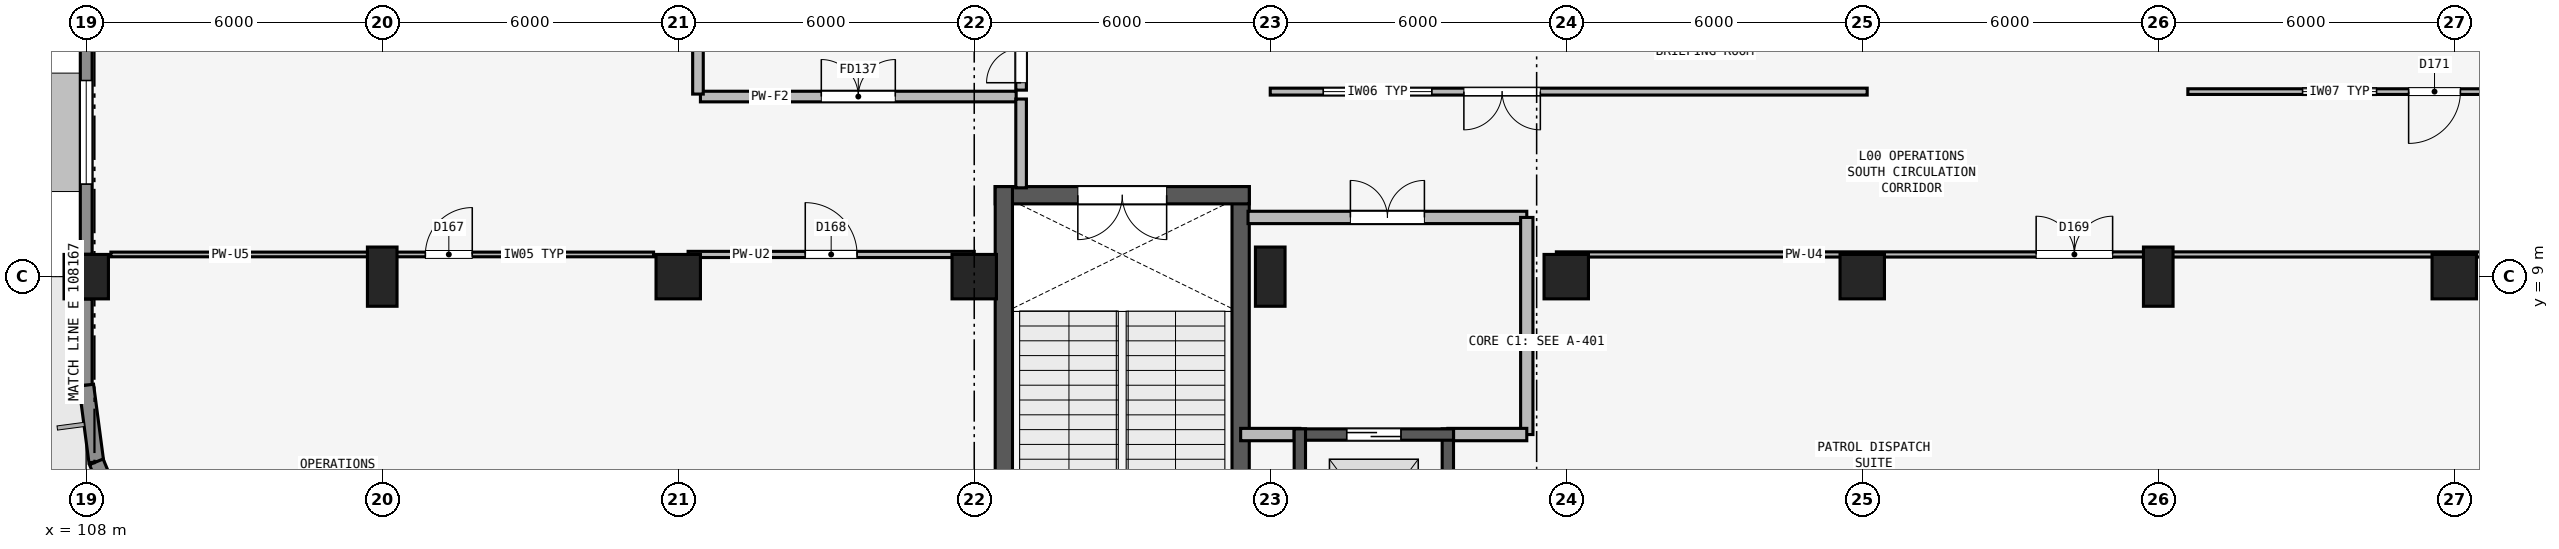
"""IFC4 building model, lengths in metres.
Left out: names, types, materials, properties, quantities, classifications, styles, units other than length and angle.
Written with IfcOpenShell. Run it as: python <this file> out.ifc"""

import sys

from ifc_helpers import new_model, si_unit, direction, frame, frame_2d, origin, origin_2d, place, context, subcontext, project, spatial, rectangle, extrude, element, fill, save


model = new_model("IFC4")
c1 = context("Model", 3, precision=1e-05, world=origin(), true_north=direction((0.0, 1.0)))
c2 = subcontext(c1, "Body", "Model", "MODEL_VIEW")
j1 = project(units=[si_unit("LENGTHUNIT", "METRE"), si_unit("PLANEANGLEUNIT", "RADIAN")], contexts=[c1])
p1 = place(None, origin())
s1 = spatial("IfcSite", under=j1, at=p1, CompositionType="ELEMENT")
p2 = place(p1, origin())
s2 = spatial("IfcBuilding", under=s1, at=p2, CompositionType="ELEMENT")
p3 = place(p2, origin())
s3 = spatial("IfcBuildingStorey", under=s2, at=p3, CompositionType="ELEMENT", Elevation=0.0)
p4 = place(p3, frame((108.0, 9.0, 0.0), z_axis=(0.0, 0.0, 1.0), x_axis=(1.0, 0.0, 0.0)))
e1 = element("IfcColumn", 1, at=p4, inside=s3, PredefinedType="COLUMN", context=c2, shape_type="SweptSolid", body=[
    extrude(rectangle(XDim=0.9, YDim=0.9, at=origin_2d()), origin(), (0.0, 0.0, 1.0), 4.8),
])
p5 = place(p3, frame((114.0, 9.0, 0.0), z_axis=(0.0, 0.0, 1.0), x_axis=(1.0, 0.0, 0.0)))
e2 = element("IfcColumn", 2, at=p5, inside=s3, PredefinedType="COLUMN", context=c2, shape_type="SweptSolid", body=[
    extrude(rectangle(XDim=0.6, YDim=1.2, at=origin_2d()), origin(), (0.0, 0.0, 1.0), 4.8),
])
for number, where, z_axis, x_axis in (
    (3, (120.0, 9.0, 0.0), (0.0, 0.0, 1.0), (1.0, 0.0, 0.0)),
    (4, (126.0, 9.0, 0.0), (0.0, 0.0, 1.0), (1.0, 0.0, 0.0)),
):
    element("IfcColumn", number, at=place(p3, frame(where, z_axis=z_axis, x_axis=x_axis)), inside=s3, PredefinedType="COLUMN", context=c2, shape_type="SweptSolid", body=[
        extrude(rectangle(XDim=0.9, YDim=0.9, at=origin_2d()), origin(), (0.0, 0.0, 1.0), 4.8),
    ])
p6 = place(p3, frame((132.0, 9.0, 0.0), z_axis=(0.0, 0.0, 1.0), x_axis=(1.0, 0.0, 0.0)))
e5 = element("IfcColumn", 5, at=p6, inside=s3, PredefinedType="COLUMN", context=c2, shape_type="SweptSolid", body=[
    extrude(rectangle(XDim=0.6, YDim=1.2, at=origin_2d()), origin(), (0.0, 0.0, 1.0), 4.8),
])
for number, where, z_axis, x_axis in (
    (6, (138.0, 9.0, 0.0), (0.0, 0.0, 1.0), (1.0, 0.0, 0.0)),
    (7, (144.0, 9.0, 0.0), (0.0, 0.0, 1.0), (1.0, 0.0, 0.0)),
):
    element("IfcColumn", number, at=place(p3, frame(where, z_axis=z_axis, x_axis=x_axis)), inside=s3, PredefinedType="COLUMN", context=c2, shape_type="SweptSolid", body=[
        extrude(rectangle(XDim=0.9, YDim=0.9, at=origin_2d()), origin(), (0.0, 0.0, 1.0), 4.8),
    ])
p7 = place(p3, frame((150.0, 9.0, 0.0), z_axis=(0.0, 0.0, 1.0), x_axis=(1.0, 0.0, 0.0)))
e8 = element("IfcColumn", 8, at=p7, inside=s3, PredefinedType="COLUMN", context=c2, shape_type="SweptSolid", body=[
    extrude(rectangle(XDim=0.6, YDim=1.2, at=origin_2d()), origin(), (0.0, 0.0, 1.0), 4.8),
])
p8 = place(p3, frame((156.0, 9.0, 0.0), z_axis=(0.0, 0.0, 1.0), x_axis=(1.0, 0.0, 0.0)))
e9 = element("IfcColumn", 9, at=p8, inside=s3, PredefinedType="COLUMN", context=c2, shape_type="SweptSolid", body=[
    extrude(rectangle(XDim=0.9, YDim=0.9, at=origin_2d()), origin(), (0.0, 0.0, 1.0), 4.8),
])
p9 = place(p3, frame((108.0, 6.8, 0.0), z_axis=(0.0, 0.0, 1.0), x_axis=(0.0, 1.0, 0.0)))
e10 = element("IfcWall", 10, at=p9, inside=s3, PredefinedType="SOLIDWALL", context=c2, shape_type="SweptSolid", body=[
    extrude(rectangle(XDim=1.746, YDim=0.24, at=frame_2d((0.873, 0.0))), origin(), (0.0, 0.0, 1.0), 4.495),
])
p10 = place(p3, frame((108.0, 9.454, 0.0), z_axis=(0.0, 0.0, 1.0), x_axis=(0.0, 1.0, 0.0)))
e11 = element("IfcWall", 11, at=p10, inside=s3, PredefinedType="SOLIDWALL", context=c2, shape_type="SweptSolid", body=[
    extrude(rectangle(XDim=4.942, YDim=0.24, at=frame_2d((2.471, 0.0))), origin(), (0.0, 0.0, 1.0), 4.09),
])
p11 = place(p10, frame((1.421, 0.0, 0.9)))
e12 = element("IfcOpeningElement", 12, at=p11, cuts=e11, PredefinedType="OPENING", context=c2, shape_type="SweptSolid", body=[
    extrude(rectangle(XDim=2.1, YDim=1.5, at=frame_2d((1.05, 0.75))), frame((0.0, 0.13, 0.0), z_axis=(0.0, -1.0, 0.0), x_axis=(1.0, 0.0, 0.0)), (0.0, 0.0, 1.0), 0.26),
])
p12 = place(p3, frame((108.0, 6.8, 0.0), z_axis=(0.0, 0.0, 1.0), x_axis=(0.130458544462, -0.991453765022, 0.0)))
e13 = element("IfcWall", 13, at=p12, inside=s3, PredefinedType="SOLIDWALL", context=c2, shape_type="SweptSolid", body=[
    extrude(rectangle(XDim=1.566, YDim=0.3, at=frame_2d((0.783, 0.0))), origin(), (0.0, 0.0, 1.0), 4.495),
])
p13 = place(p3, frame((108.204, 5.247, 0.0), z_axis=(0.0, 0.0, 1.0), x_axis=(0.382677606907, -0.923881945474, 0.0)))
e14 = element("IfcWall", 14, at=p13, inside=s3, PredefinedType="SOLIDWALL", context=c2, shape_type="SweptSolid", body=[
    extrude(rectangle(XDim=1.566, YDim=0.3, at=frame_2d((0.783, 0.0))), origin(), (0.0, 0.0, 1.0), 4.495),
])
p14 = place(p3, frame((131.4, 1.075, 0.0), z_axis=(0.0, 0.0, 1.0), x_axis=(0.0, 1.0, 0.0)))
e15 = element("IfcWall", 15, at=p14, inside=s3, PredefinedType="SHEAR", context=c2, shape_type="SweptSolid", body=[
    extrude(rectangle(XDim=9.75, YDim=0.35, at=frame_2d((4.875, 0.0))), origin(), (0.0, 0.0, 1.0), 4.66),
])
p15 = place(p3, frame((131.575, 10.65, 0.0), z_axis=(0.0, 0.0, 1.0), x_axis=(-1.0, 0.0, 0.0)))
e16 = element("IfcWall", 16, at=p15, inside=s3, PredefinedType="SHEAR", context=c2, shape_type="SweptSolid", body=[
    extrude(rectangle(XDim=5.15, YDim=0.35, at=frame_2d((2.575, 0.0))), origin(), (0.0, 0.0, 1.0), 4.66),
])
p16 = place(p15, frame((1.675, 0.0, 0.0)))
e17 = element("IfcOpeningElement", 17, at=p16, cuts=e16, PredefinedType="OPENING", context=c2, shape_type="SweptSolid", body=[
    extrude(rectangle(XDim=1.8, YDim=2.2, at=frame_2d((0.9, 1.1))), frame((0.0, 0.185, 0.0), z_axis=(0.0, -1.0, 0.0), x_axis=(1.0, 0.0, 0.0)), (0.0, 0.0, 1.0), 0.37),
])
p17 = place(p3, frame((126.6, 10.825, 0.0), z_axis=(0.0, 0.0, 1.0), x_axis=(0.0, -1.0, 0.0)))
e18 = element("IfcWall", 18, at=p17, inside=s3, PredefinedType="SHEAR", context=c2, shape_type="SweptSolid", body=[
    extrude(rectangle(XDim=9.75, YDim=0.35, at=frame_2d((4.875, 0.0))), origin(), (0.0, 0.0, 1.0), 4.66),
])
p18 = place(p3, frame((126.95, 12.78, 0.0), z_axis=(0.0, 0.0, 1.0), x_axis=(0.0, 1.0, 0.0)))
e19 = element("IfcWall", 19, at=p18, inside=s3, PredefinedType="PARTITIONING", context=c2, shape_type="SweptSolid", body=[
    extrude(rectangle(XDim=1.7, YDim=0.215, at=frame_2d((0.85, 0.0))), origin(), (0.0, 0.0, 1.0), 4.49),
])
p19 = place(p18, frame((0.15, 0.0, 0.0)))
e20 = element("IfcOpeningElement", 20, at=p19, cuts=e19, PredefinedType="OPENING", context=c2, shape_type="SweptSolid", body=[
    extrude(rectangle(XDim=1.4, YDim=2.2, at=frame_2d((0.7, 1.1))), frame((0.0, 0.117, 0.0), z_axis=(0.0, -1.0, 0.0), x_axis=(1.0, 0.0, 0.0)), (0.0, 0.0, 1.0), 0.235),
])
p20 = place(p3, frame((131.55, 10.2, 0.0), z_axis=(0.0, 0.0, 1.0), x_axis=(1.0, 0.0, 0.0)))
e21 = element("IfcWall", 21, at=p20, inside=s3, PredefinedType="PARTITIONING", context=c2, shape_type="SweptSolid", body=[
    extrude(rectangle(XDim=5.65, YDim=0.25, at=frame_2d((2.825, 0.0))), origin(), (0.0, 0.0, 1.0), 4.09),
])
p21 = place(p20, frame((2.075, 0.0, 0.0)))
e22 = element("IfcOpeningElement", 22, at=p21, cuts=e21, PredefinedType="OPENING", context=c2, shape_type="SweptSolid", body=[
    extrude(rectangle(XDim=1.5, YDim=2.15, at=frame_2d((0.75, 1.075))), frame((0.0, 0.135, 0.0), z_axis=(0.0, -1.0, 0.0), x_axis=(1.0, 0.0, 0.0)), (0.0, 0.0, 1.0), 0.27),
])
p22 = place(p3, frame((137.2, 5.8, 0.0), z_axis=(0.0, 0.0, 1.0), x_axis=(0.0, 1.0, 0.0)))
e23 = element("IfcWall", 23, at=p22, inside=s3, PredefinedType="PARTITIONING", context=c2, shape_type="SweptSolid", body=[
    extrude(rectangle(XDim=4.4, YDim=0.25, at=frame_2d((2.2, 0.0))), origin(), (0.0, 0.0, 1.0), 4.09),
])
p23 = place(p3, frame((135.6, 5.8, 0.0), z_axis=(0.0, 0.0, 1.0), x_axis=(1.0, 0.0, 0.0)))
e24 = element("IfcWall", 24, at=p23, inside=s3, PredefinedType="PARTITIONING", context=c2, shape_type="SweptSolid", body=[
    extrude(rectangle(XDim=1.6, YDim=0.25, at=frame_2d((0.8, 0.0))), origin(), (0.0, 0.0, 1.0), 4.49),
])
p24 = place(p3, frame((131.4, 5.8, 0.0), z_axis=(0.0, 0.0, 1.0), x_axis=(1.0, 0.0, 0.0)))
e25 = element("IfcWall", 25, at=p24, inside=s3, PredefinedType="PARTITIONING", context=c2, shape_type="SweptSolid", body=[
    extrude(rectangle(XDim=1.2, YDim=0.25, at=frame_2d((0.6, 0.0))), origin(), (0.0, 0.0, 1.0), 4.04),
])
p25 = place(p3, frame((135.6, 2.285, 0.0), z_axis=(0.0, 0.0, 1.0), x_axis=(0.0, 1.0, 0.0)))
e26 = element("IfcWall", 26, at=p25, inside=s3, PredefinedType="SHEAR", context=c2, shape_type="SweptSolid", body=[
    extrude(rectangle(XDim=3.63, YDim=0.23, at=frame_2d((1.815, 0.0))), origin(), (0.0, 0.0, 1.0), 4.8),
])
p26 = place(p3, frame((135.715, 5.8, 0.0), z_axis=(0.0, 0.0, 1.0), x_axis=(-1.0, 0.0, 0.0)))
e27 = element("IfcWall", 27, at=p26, inside=s3, PredefinedType="SHEAR", context=c2, shape_type="SweptSolid", body=[
    extrude(rectangle(XDim=3.23, YDim=0.23, at=frame_2d((1.615, 0.0))), origin(), (0.0, 0.0, 1.0), 4.8),
])
p27 = place(p26, frame((1.065, 0.0, 0.0)))
e28 = element("IfcOpeningElement", 28, at=p27, cuts=e27, PredefinedType="OPENING", context=c2, shape_type="SweptSolid", body=[
    extrude(rectangle(XDim=1.1, YDim=2.2, at=frame_2d((0.55, 1.1))), frame((0.0, 0.125, 0.0), z_axis=(0.0, -1.0, 0.0), x_axis=(1.0, 0.0, 0.0)), (0.0, 0.0, 1.0), 0.25),
])
p28 = place(p3, frame((132.6, 5.915, 0.0), z_axis=(0.0, 0.0, 1.0), x_axis=(0.0, -1.0, 0.0)))
e29 = element("IfcWall", 29, at=p28, inside=s3, PredefinedType="SHEAR", context=c2, shape_type="SweptSolid", body=[
    extrude(rectangle(XDim=3.63, YDim=0.23, at=frame_2d((1.815, 0.0))), origin(), (0.0, 0.0, 1.0), 4.8),
])
p29 = place(p3, frame((120.45, 12.65, 0.0), z_axis=(0.0, 0.0, 1.0), x_axis=(1.0, 0.0, 0.0)))
e30 = element("IfcWall", 30, at=p29, inside=s3, PredefinedType="PARTITIONING", context=c2, shape_type="SweptSolid", body=[
    extrude(rectangle(XDim=6.4, YDim=0.215, at=frame_2d((3.2, 0.0))), origin(), (0.0, 0.0, 1.0), 4.09),
])
p30 = place(p29, frame((2.45, 0.0, 0.0)))
e31 = element("IfcOpeningElement", 31, at=p30, cuts=e30, PredefinedType="OPENING", context=c2, shape_type="SweptSolid", body=[
    extrude(rectangle(XDim=1.5, YDim=2.15, at=frame_2d((0.75, 1.075))), frame((0.0, 0.117, 0.0), z_axis=(0.0, -1.0, 0.0), x_axis=(1.0, 0.0, 0.0)), (0.0, 0.0, 1.0), 0.235),
])
p31 = place(p3, frame((126.95, 10.8, 0.0), z_axis=(0.0, 0.0, 1.0), x_axis=(0.0, 1.0, 0.0)))
e32 = element("IfcWall", 32, at=p31, inside=s3, PredefinedType="PARTITIONING", context=c2, shape_type="SweptSolid", body=[
    extrude(rectangle(XDim=1.8, YDim=0.215, at=frame_2d((0.9, 0.0))), origin(), (0.0, 0.0, 1.0), 4.49),
])
p32 = place(p3, frame((120.4, 12.7, 0.0), z_axis=(0.0, 0.0, 1.0), x_axis=(0.0, 1.0, 0.0)))
e33 = element("IfcWall", 33, at=p32, inside=s3, PredefinedType="PARTITIONING", context=c2, shape_type="SweptSolid", body=[
    extrude(rectangle(XDim=2.15, YDim=0.215, at=frame_2d((1.075, 0.0))), origin(), (0.0, 0.0, 1.0), 3.94),
])
p33 = place(p3, frame((108.5, 9.45, 0.0), z_axis=(0.0, 0.0, 1.0), x_axis=(1.0, 0.0, 0.0)))
e34 = element("IfcWall", 34, at=p33, inside=s3, PredefinedType="PARTITIONING", context=c2, shape_type="SweptSolid", body=[
    extrude(rectangle(XDim=11.0, YDim=0.095, at=frame_2d((5.5, 0.0))), origin(), (0.0, 0.0, 1.0), 4.09),
])
p34 = place(p33, frame((6.375, 0.0, 0.0)))
e35 = element("IfcOpeningElement", 35, at=p34, cuts=e34, PredefinedType="OPENING", context=c2, shape_type="SweptSolid", body=[
    extrude(rectangle(XDim=0.95, YDim=2.15, at=frame_2d((0.475, 1.075))), frame((0.0, 0.057, 0.0), z_axis=(0.0, -1.0, 0.0), x_axis=(1.0, 0.0, 0.0)), (0.0, 0.0, 1.0), 0.115),
])
p35 = place(p33, frame((7.975, 0.0, 1.15)))
e36 = element("IfcOpeningElement", 36, at=p35, cuts=e34, PredefinedType="OPENING", context=c2, shape_type="SweptSolid", body=[
    extrude(rectangle(XDim=1.2, YDim=0.9, at=frame_2d((0.6, 0.45))), frame((0.0, 0.057, 0.0), z_axis=(0.0, -1.0, 0.0), x_axis=(1.0, 0.0, 0.0)), (0.0, 0.0, 1.0), 0.115),
])
p36 = place(p3, frame((120.2, 9.45, 0.0), z_axis=(0.0, 0.0, 1.0), x_axis=(1.0, 0.0, 0.0)))
e37 = element("IfcWall", 37, at=p36, inside=s3, PredefinedType="PARTITIONING", context=c2, shape_type="SweptSolid", body=[
    extrude(rectangle(XDim=5.8, YDim=0.125, at=frame_2d((2.9, 0.0))), origin(), (0.0, 0.0, 1.0), 4.09),
])
p37 = place(p36, frame((2.375, 0.0, 0.0)))
e38 = element("IfcOpeningElement", 38, at=p37, cuts=e37, PredefinedType="OPENING", context=c2, shape_type="SweptSolid", body=[
    extrude(rectangle(XDim=1.05, YDim=2.2, at=frame_2d((0.525, 1.1))), frame((0.0, 0.073, 0.0), z_axis=(0.0, -1.0, 0.0), x_axis=(1.0, 0.0, 0.0)), (0.0, 0.0, 1.0), 0.145),
])
p38 = place(p3, frame((137.8, 9.45, 0.0), z_axis=(0.0, 0.0, 1.0), x_axis=(1.0, 0.0, 0.0)))
e39 = element("IfcWall", 39, at=p38, inside=s3, PredefinedType="PARTITIONING", context=c2, shape_type="SweptSolid", body=[
    extrude(rectangle(XDim=22.8, YDim=0.105, at=frame_2d((11.4, 0.0))), origin(), (0.0, 0.0, 1.0), 4.09),
])
p39 = place(p38, frame((9.725, 0.0, 0.0)))
e40 = element("IfcOpeningElement", 40, at=p39, cuts=e39, PredefinedType="OPENING", context=c2, shape_type="SweptSolid", body=[
    extrude(rectangle(XDim=1.55, YDim=2.2, at=frame_2d((0.775, 1.1))), frame((0.0, 0.062, 0.0), z_axis=(0.0, -1.0, 0.0), x_axis=(1.0, 0.0, 0.0)), (0.0, 0.0, 1.0), 0.125),
])
p40 = place(p3, frame((144.1, 12.75, 0.0), z_axis=(0.0, 0.0, 1.0), x_axis=(-1.0, 0.0, 0.0)))
e41 = element("IfcWall", 41, at=p40, inside=s3, PredefinedType="PARTITIONING", context=c2, shape_type="SweptSolid", body=[
    extrude(rectangle(XDim=12.1, YDim=0.14, at=frame_2d((6.05, 0.0))), origin(), (0.0, 0.0, 1.0), 4.09),
])
p41 = place(p40, frame((6.625, 0.0, 0.0)))
e42 = element("IfcOpeningElement", 42, at=p41, cuts=e41, PredefinedType="OPENING", context=c2, shape_type="SweptSolid", body=[
    extrude(rectangle(XDim=1.55, YDim=2.2, at=frame_2d((0.775, 1.1))), frame((0.0, 0.08, 0.0), z_axis=(0.0, -1.0, 0.0), x_axis=(1.0, 0.0, 0.0)), (0.0, 0.0, 1.0), 0.16),
])
p42 = place(p40, frame((8.825, 0.0, 0.9)))
e43 = element("IfcOpeningElement", 43, at=p42, cuts=e41, PredefinedType="OPENING", context=c2, shape_type="SweptSolid", body=[
    extrude(rectangle(XDim=2.2, YDim=1.4, at=frame_2d((1.1, 0.7))), frame((0.0, 0.08, 0.0), z_axis=(0.0, -1.0, 0.0), x_axis=(1.0, 0.0, 0.0)), (0.0, 0.0, 1.0), 0.16),
])
p43 = place(p3, frame((160.6, 12.75, 0.0), z_axis=(0.0, 0.0, 1.0), x_axis=(-1.0, 0.0, 0.0)))
e44 = element("IfcWall", 44, at=p43, inside=s3, PredefinedType="PARTITIONING", context=c2, shape_type="SweptSolid", body=[
    extrude(rectangle(XDim=10.0, YDim=0.115, at=frame_2d((5.0, 0.0))), origin(), (0.0, 0.0, 1.0), 4.09),
])
p44 = place(p43, frame((4.475, 0.0, 0.0)))
e45 = element("IfcOpeningElement", 45, at=p44, cuts=e44, PredefinedType="OPENING", context=c2, shape_type="SweptSolid", body=[
    extrude(rectangle(XDim=1.05, YDim=2.2, at=frame_2d((0.525, 1.1))), frame((0.0, 0.067, 0.0), z_axis=(0.0, -1.0, 0.0), x_axis=(1.0, 0.0, 0.0)), (0.0, 0.0, 1.0), 0.135),
])
p45 = place(p43, frame((6.175, 0.0, 1.0)))
e46 = element("IfcOpeningElement", 46, at=p45, cuts=e44, PredefinedType="OPENING", context=c2, shape_type="SweptSolid", body=[
    extrude(rectangle(XDim=1.5, YDim=1.2, at=frame_2d((0.75, 0.6))), frame((0.0, 0.067, 0.0), z_axis=(0.0, -1.0, 0.0), x_axis=(1.0, 0.0, 0.0)), (0.0, 0.0, 1.0), 0.135),
])
p46 = place(p11, origin())
e47 = element("IfcWindow", 47, at=p46, inside=s3, PartitioningType="SINGLE_PANEL", PredefinedType="WINDOW", context=c2, shape_type="SweptSolid", body=[
    extrude(rectangle(XDim=2.1, YDim=1.5, at=frame_2d((1.05, 0.75))), frame((0.0, 0.03, 0.0), z_axis=(0.0, -1.0, 0.0), x_axis=(1.0, 0.0, 0.0)), (0.0, 0.0, 1.0), 0.06),
])
fill(e12, e47)
p47 = place(p16, origin())
e48 = element("IfcDoor", 48, at=p47, inside=s3, OperationType="DOUBLE_DOOR_SINGLE_SWING", PredefinedType="DOOR", context=c2, shape_type="SweptSolid", body=[
    extrude(rectangle(XDim=1.8, YDim=2.2, at=frame_2d((0.9, 1.1))), frame((0.0, 0.025, 0.0), z_axis=(0.0, -1.0, 0.0), x_axis=(1.0, 0.0, 0.0)), (0.0, 0.0, 1.0), 0.05),
])
fill(e17, e48)
p48 = place(p19, origin())
e49 = element("IfcDoor", 49, at=p48, inside=s3, OperationType="DOUBLE_DOOR_SINGLE_SWING", PredefinedType="DOOR", context=c2, shape_type="SweptSolid", body=[
    extrude(rectangle(XDim=1.4, YDim=2.2, at=frame_2d((0.7, 1.1))), frame((0.0, 0.025, 0.0), z_axis=(0.0, -1.0, 0.0), x_axis=(1.0, 0.0, 0.0)), (0.0, 0.0, 1.0), 0.05),
])
fill(e20, e49)
p49 = place(p21, origin())
e50 = element("IfcDoor", 50, at=p49, inside=s3, OperationType="DOUBLE_DOOR_SINGLE_SWING", PredefinedType="DOOR", context=c2, shape_type="SweptSolid", body=[
    extrude(rectangle(XDim=1.5, YDim=2.15, at=frame_2d((0.75, 1.075))), frame((0.0, 0.025, 0.0), z_axis=(0.0, -1.0, 0.0), x_axis=(1.0, 0.0, 0.0)), (0.0, 0.0, 1.0), 0.05),
])
fill(e22, e50)
p50 = place(p27, origin())
e51 = element("IfcDoor", 51, at=p50, inside=s3, OperationType="SLIDING_TO_LEFT", PredefinedType="DOOR", context=c2, shape_type="SweptSolid", body=[
    extrude(rectangle(XDim=1.1, YDim=2.2, at=frame_2d((0.55, 1.1))), frame((0.0, 0.025, 0.0), z_axis=(0.0, -1.0, 0.0), x_axis=(1.0, 0.0, 0.0)), (0.0, 0.0, 1.0), 0.05),
])
fill(e28, e51)
p51 = place(p30, origin())
e52 = element("IfcDoor", 52, at=p51, inside=s3, OperationType="DOUBLE_DOOR_SINGLE_SWING", PredefinedType="DOOR", context=c2, shape_type="SweptSolid", body=[
    extrude(rectangle(XDim=1.5, YDim=2.15, at=frame_2d((0.75, 1.075))), frame((0.0, 0.025, 0.0), z_axis=(0.0, -1.0, 0.0), x_axis=(1.0, 0.0, 0.0)), (0.0, 0.0, 1.0), 0.05),
])
fill(e31, e52)
p52 = place(p34, origin())
e53 = element("IfcDoor", 53, at=p52, inside=s3, OperationType="SINGLE_SWING_RIGHT", PredefinedType="DOOR", context=c2, shape_type="SweptSolid", body=[
    extrude(rectangle(XDim=0.95, YDim=2.15, at=frame_2d((0.475, 1.075))), frame((0.0, 0.025, 0.0), z_axis=(0.0, -1.0, 0.0), x_axis=(1.0, 0.0, 0.0)), (0.0, 0.0, 1.0), 0.05),
])
fill(e35, e53)
p53 = place(p35, origin())
e54 = element("IfcWindow", 54, at=p53, inside=s3, PartitioningType="SINGLE_PANEL", PredefinedType="WINDOW", context=c2, shape_type="SweptSolid", body=[
    extrude(rectangle(XDim=1.2, YDim=0.9, at=frame_2d((0.6, 0.45))), frame((0.0, 0.03, 0.0), z_axis=(0.0, -1.0, 0.0), x_axis=(1.0, 0.0, 0.0)), (0.0, 0.0, 1.0), 0.06),
])
fill(e36, e54)
p54 = place(p37, origin())
e55 = element("IfcDoor", 55, at=p54, inside=s3, OperationType="SINGLE_SWING_LEFT", PredefinedType="DOOR", context=c2, shape_type="SweptSolid", body=[
    extrude(rectangle(XDim=1.05, YDim=2.2, at=frame_2d((0.525, 1.1))), frame((0.0, 0.025, 0.0), z_axis=(0.0, -1.0, 0.0), x_axis=(1.0, 0.0, 0.0)), (0.0, 0.0, 1.0), 0.05),
])
fill(e38, e55)
p55 = place(p39, origin())
e56 = element("IfcDoor", 56, at=p55, inside=s3, OperationType="DOUBLE_DOOR_SINGLE_SWING", PredefinedType="DOOR", context=c2, shape_type="SweptSolid", body=[
    extrude(rectangle(XDim=1.55, YDim=2.2, at=frame_2d((0.775, 1.1))), frame((0.0, 0.025, 0.0), z_axis=(0.0, -1.0, 0.0), x_axis=(1.0, 0.0, 0.0)), (0.0, 0.0, 1.0), 0.05),
])
fill(e40, e56)
p56 = place(p41, origin())
e57 = element("IfcDoor", 57, at=p56, inside=s3, OperationType="DOUBLE_DOOR_SINGLE_SWING", PredefinedType="DOOR", context=c2, shape_type="SweptSolid", body=[
    extrude(rectangle(XDim=1.55, YDim=2.2, at=frame_2d((0.775, 1.1))), frame((0.0, 0.025, 0.0), z_axis=(0.0, -1.0, 0.0), x_axis=(1.0, 0.0, 0.0)), (0.0, 0.0, 1.0), 0.05),
])
fill(e42, e57)
p57 = place(p42, origin())
e58 = element("IfcWindow", 58, at=p57, inside=s3, PartitioningType="SINGLE_PANEL", PredefinedType="WINDOW", context=c2, shape_type="SweptSolid", body=[
    extrude(rectangle(XDim=2.2, YDim=1.4, at=frame_2d((1.1, 0.7))), frame((0.0, 0.03, 0.0), z_axis=(0.0, -1.0, 0.0), x_axis=(1.0, 0.0, 0.0)), (0.0, 0.0, 1.0), 0.06),
])
fill(e43, e58)
p58 = place(p44, origin())
e59 = element("IfcDoor", 59, at=p58, inside=s3, OperationType="SINGLE_SWING_RIGHT", PredefinedType="DOOR", context=c2, shape_type="SweptSolid", body=[
    extrude(rectangle(XDim=1.05, YDim=2.2, at=frame_2d((0.525, 1.1))), frame((0.0, 0.025, 0.0), z_axis=(0.0, -1.0, 0.0), x_axis=(1.0, 0.0, 0.0)), (0.0, 0.0, 1.0), 0.05),
])
fill(e45, e59)
p59 = place(p45, origin())
e60 = element("IfcWindow", 60, at=p59, inside=s3, PartitioningType="SINGLE_PANEL", PredefinedType="WINDOW", context=c2, shape_type="SweptSolid", body=[
    extrude(rectangle(XDim=1.5, YDim=1.2, at=frame_2d((0.75, 0.6))), frame((0.0, 0.03, 0.0), z_axis=(0.0, -1.0, 0.0), x_axis=(1.0, 0.0, 0.0)), (0.0, 0.0, 1.0), 0.06),
])
fill(e46, e60)
save(model, sys.argv[1])
